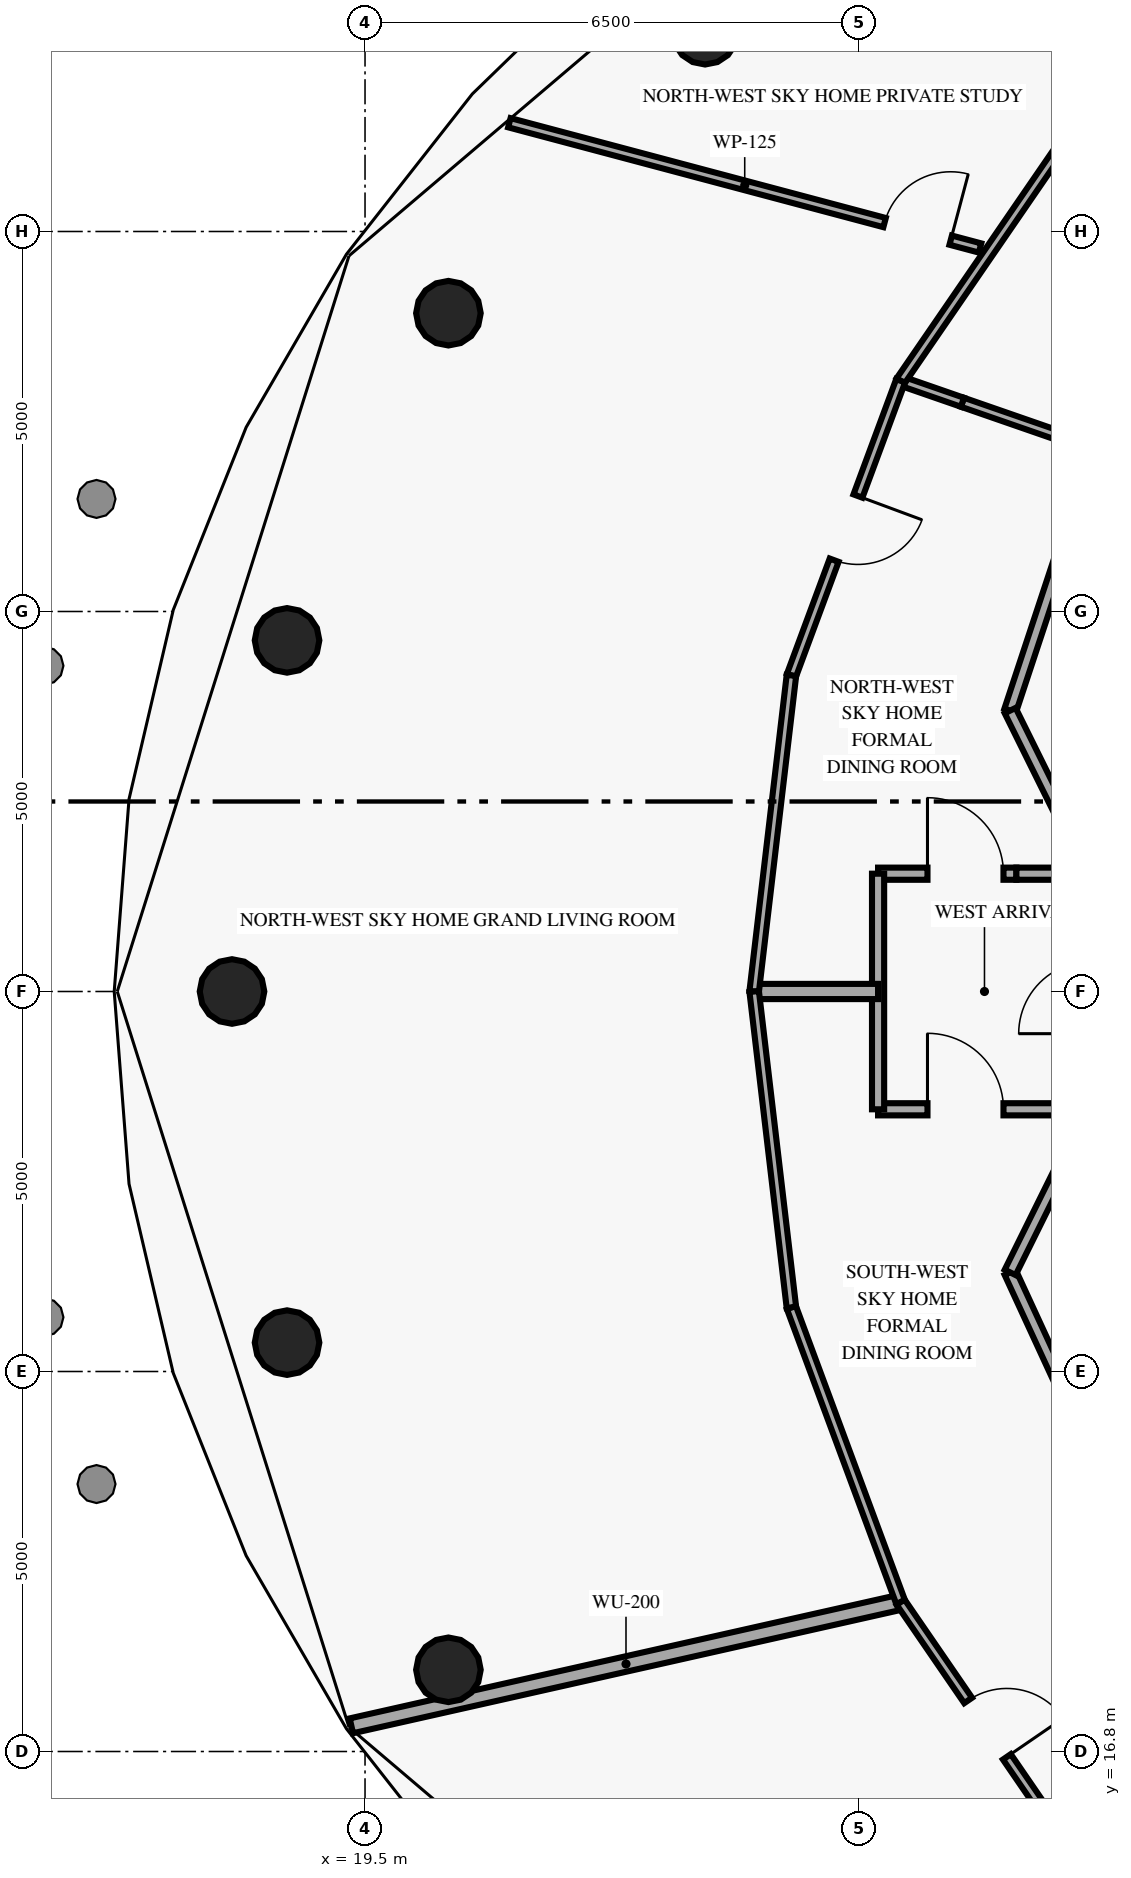
"""IFC4 building model, lengths in metres.
Left out: names, types, materials, properties, quantities, classifications, styles, units other than length and angle.
Written with IfcOpenShell. Run it as: python <this file> out.ifc"""

import sys

from ifc_helpers import new_model, si_unit, direction, frame, frame_2d, origin, origin_2d, place, context, subcontext, project, spatial, rectangle, circle, extrude, element, fill, save


model = new_model("IFC4")
c1 = context("Model", 3, precision=1e-05, world=origin(), true_north=direction((0.0, 1.0)))
c2 = subcontext(c1, "Body", "Model", "MODEL_VIEW")
j1 = project(units=[si_unit("LENGTHUNIT", "METRE"), si_unit("PLANEANGLEUNIT", "RADIAN")], contexts=[c1])
p1 = place(None, origin())
s1 = spatial("IfcSite", under=j1, at=p1, CompositionType="ELEMENT")
p2 = place(p1, origin())
s2 = spatial("IfcBuilding", under=s1, at=p2, CompositionType="ELEMENT")
p3 = place(p2, frame((0.0, 0.0, 251.95)))
s3 = spatial("IfcBuildingStorey", under=s2, at=p3, CompositionType="ELEMENT", Elevation=251.95)
for number, where, z_axis, x_axis in (
    (1, (23.974, 39.422, 0.0), (0.0, 0.0, 1.0), (1.0, 0.0, 0.0)),
    (2, (20.597, 35.725, 0.0), (0.0, 0.0, 1.0), (1.0, 0.0, 0.0)),
    (3, (18.474, 31.42, 0.0), (0.0, 0.0, 1.0), (1.0, 0.0, 0.0)),
    (4, (17.75, 26.8, 0.0), (0.0, 0.0, 1.0), (1.0, 0.0, 0.0)),
    (5, (18.474, 22.18, 0.0), (0.0, 0.0, 1.0), (1.0, 0.0, 0.0)),
    (6, (20.597, 17.875, 0.0), (0.0, 0.0, 1.0), (1.0, 0.0, 0.0)),
):
    element("IfcColumn", number, at=place(p3, frame(where, z_axis=z_axis, x_axis=x_axis)), inside=s3, PredefinedType="COLUMN", context=c2, shape_type="SweptSolid", body=[
        extrude(circle(Radius=0.425, at=origin_2d()), origin(), (0.0, 0.0, 1.0), 3.39),
    ])
p4 = place(p3, frame((29.127, 33.94, 0.0), z_axis=(0.0, 0.0, 1.0), x_axis=(-0.313985571683, -0.949427754374, 0.0)))
e7 = element("IfcWall", 7, at=p4, inside=s3, PredefinedType="PARTITIONING", context=c2, shape_type="SweptSolid", body=[
    extrude(rectangle(XDim=3.627, YDim=0.16, at=frame_2d((1.813, 0.0))), origin(), (0.0, 0.0, 1.0), 3.39),
])
p5 = place(p3, frame((27.988, 23.104, 0.0), z_axis=(0.0, 0.0, 1.0), x_axis=(0.418656179426, -0.908144814128, 0.0)))
e8 = element("IfcWall", 8, at=p5, inside=s3, PredefinedType="PARTITIONING", context=c2, shape_type="SweptSolid", body=[
    extrude(rectangle(XDim=7.049, YDim=0.16, at=frame_2d((3.524, 0.0))), origin(), (0.0, 0.0, 1.0), 3.39),
])
p6 = place(p3, frame((26.25, 28.35, 0.0), z_axis=(0.0, 0.0, 1.0), x_axis=(1.0, 0.0, 0.0)))
e9 = element("IfcWall", 9, at=p6, inside=s3, PredefinedType="PARTITIONING", context=c2, shape_type="SweptSolid", body=[
    extrude(rectangle(XDim=1.82, YDim=0.16, at=frame_2d((0.91, 0.0))), origin(), (0.0, 0.0, 1.0), 3.39),
])
p7 = place(p6, frame((0.65, 0.0, 0.0)))
e10 = element("IfcOpeningElement", 10, at=p7, cuts=e9, PredefinedType="OPENING", context=c2, shape_type="SweptSolid", body=[
    extrude(rectangle(XDim=1.0, YDim=2.02, at=frame_2d((0.5, 1.01))), frame((0.0, 0.09, 0.0), z_axis=(0.0, -1.0, 0.0), x_axis=(1.0, 0.0, 0.0)), (0.0, 0.0, 1.0), 0.18),
])
p8 = place(p3, frame((28.07, 28.35, 0.0), z_axis=(0.0, 0.0, 1.0), x_axis=(1.0, 0.0, 0.0)))
e11 = element("IfcWall", 11, at=p8, inside=s3, PredefinedType="PARTITIONING", context=c2, shape_type="SweptSolid", body=[
    extrude(rectangle(XDim=0.98, YDim=0.16, at=frame_2d((0.49, 0.0))), origin(), (0.0, 0.0, 1.0), 2.53),
])
p9 = place(p3, frame((26.25, 25.25, 0.0), z_axis=(0.0, 0.0, 1.0), x_axis=(1.0, 0.0, 0.0)))
e12 = element("IfcWall", 12, at=p9, inside=s3, PredefinedType="PARTITIONING", context=c2, shape_type="SweptSolid", body=[
    extrude(rectangle(XDim=2.8, YDim=0.16, at=frame_2d((1.4, 0.0))), origin(), (0.0, 0.0, 1.0), 3.39),
])
p10 = place(p9, frame((0.65, 0.0, 0.0)))
e13 = element("IfcOpeningElement", 13, at=p10, cuts=e12, PredefinedType="OPENING", context=c2, shape_type="SweptSolid", body=[
    extrude(rectangle(XDim=1.0, YDim=2.02, at=frame_2d((0.5, 1.01))), frame((0.0, 0.09, 0.0), z_axis=(0.0, -1.0, 0.0), x_axis=(1.0, 0.0, 0.0)), (0.0, 0.0, 1.0), 0.18),
])
p11 = place(p3, frame((26.25, 25.25, 0.0), z_axis=(0.0, 0.0, 1.0), x_axis=(0.0, 1.0, 0.0)))
e14 = element("IfcWall", 14, at=p11, inside=s3, PredefinedType="PARTITIONING", context=c2, shape_type="SweptSolid", body=[
    extrude(rectangle(XDim=3.1, YDim=0.16, at=frame_2d((1.55, 0.0))), origin(), (0.0, 0.0, 1.0), 3.39),
])
for number, where, z_axis, x_axis in (
    (15, (27.988, 30.496, 0.0), (0.0, 0.0, 1.0), (0.444, -0.896, 0.0)),
    (16, (27.988, 23.104, 0.0), (0.0, 0.0, 1.0), (0.444, 0.896, 0.0)),
):
    element("IfcWall", number, at=place(p3, frame(where, z_axis=z_axis, x_axis=x_axis)), inside=s3, PredefinedType="PARTITIONING", context=c2, shape_type="SweptSolid", body=[
        extrude(rectangle(XDim=2.394, YDim=0.16, at=frame_2d((1.197, 0.0))), origin(), (0.0, 0.0, 1.0), 3.39),
    ])
p12 = place(p3, frame((26.25, 26.8, 0.0), z_axis=(0.0, 0.0, 1.0), x_axis=(-1.0, 0.0, 0.0)))
e17 = element("IfcWall", 17, at=p12, inside=s3, PredefinedType="PARTITIONING", context=c2, shape_type="SweptSolid", body=[
    extrude(rectangle(XDim=1.63, YDim=0.2, at=frame_2d((0.815, 0.0))), origin(), (0.0, 0.0, 1.0), 3.39),
])
p13 = place(p3, frame((26.547, 18.765, 0.0), z_axis=(0.0, 0.0, 1.0), x_axis=(-0.975584694012, -0.219623552493, 0.0)))
e18 = element("IfcWall", 18, at=p13, inside=s3, PredefinedType="PARTITIONING", context=c2, shape_type="SweptSolid", body=[
    extrude(rectangle(XDim=7.408, YDim=0.2, at=frame_2d((3.704, 0.0))), origin(), (0.0, 0.0, 1.0), 3.39),
])
p14 = place(p3, frame((29.127, 33.94, 0.0), z_axis=(0.0, 0.0, 1.0), x_axis=(-0.944748361613, 0.327796481416, 0.0)))
e19 = element("IfcWall", 19, at=p14, inside=s3, PredefinedType="PARTITIONING", context=c2, shape_type="SweptSolid", body=[
    extrude(rectangle(XDim=1.87, YDim=0.125, at=frame_2d((0.935, 0.0))), origin(), (0.0, 0.0, 1.0), 3.39),
])
p15 = place(p3, frame((27.36, 34.553, 0.0), z_axis=(0.0, 0.0, 1.0), x_axis=(-0.944783504011, 0.327695179319, 0.0)))
e20 = element("IfcWall", 20, at=p15, inside=s3, PredefinedType="PARTITIONING", context=c2, shape_type="SweptSolid", body=[
    extrude(rectangle(XDim=0.861, YDim=0.125, at=frame_2d((0.43, 0.0))), origin(), (0.0, 0.0, 1.0), 2.19),
])
p16 = place(p3, frame((28.832, 38.163, 0.0), z_axis=(0.0, 0.0, 1.0), x_axis=(-0.565994846929, -0.824408778004, 0.0)))
e21 = element("IfcWall", 21, at=p16, inside=s3, PredefinedType="PARTITIONING", context=c2, shape_type="SweptSolid", body=[
    extrude(rectangle(XDim=4.037, YDim=0.125, at=frame_2d((2.019, 0.0))), origin(), (0.0, 0.0, 1.0), 3.39),
])
p17 = place(p3, frame((25.11, 30.959, 0.0), z_axis=(0.0, 0.0, 1.0), x_axis=(0.347625950087, 0.937633296564, 0.0)))
e22 = element("IfcWall", 22, at=p17, inside=s3, PredefinedType="PARTITIONING", context=c2, shape_type="SweptSolid", body=[
    extrude(rectangle(XDim=4.134, YDim=0.125, at=frame_2d((2.067, 0.0))), origin(), (0.0, 0.0, 1.0), 3.39),
])
p18 = place(p17, frame((1.617, 0.0, 0.0)))
e23 = element("IfcOpeningElement", 23, at=p18, cuts=e22, PredefinedType="OPENING", context=c2, shape_type="SweptSolid", body=[
    extrude(rectangle(XDim=0.9, YDim=2.02, at=frame_2d((0.45, 1.01))), frame((0.0, 0.073, 0.0), z_axis=(0.0, -1.0, 0.0), x_axis=(1.0, 0.0, 0.0)), (0.0, 0.0, 1.0), 0.145),
])
for number, where, z_axis, x_axis in (
    (24, (25.11, 30.959, 0.0), (0.0, 0.0, 1.0), (-0.117, -0.993, 0.0)),
    (25, (24.62, 26.8, 0.0), (0.0, 0.0, 1.0), (0.117, -0.993, 0.0)),
):
    element("IfcWall", number, at=place(p3, frame(where, z_axis=z_axis, x_axis=x_axis)), inside=s3, PredefinedType="PARTITIONING", context=c2, shape_type="SweptSolid", body=[
        extrude(rectangle(XDim=4.188, YDim=0.125, at=frame_2d((2.094, 0.0))), origin(), (0.0, 0.0, 1.0), 3.39),
    ])
p19 = place(p3, frame((25.11, 22.641, 0.0), z_axis=(0.0, 0.0, 1.0), x_axis=(0.347606700796, -0.937640432982, 0.0)))
e26 = element("IfcWall", 26, at=p19, inside=s3, PredefinedType="PARTITIONING", context=c2, shape_type="SweptSolid", body=[
    extrude(rectangle(XDim=4.134, YDim=0.125, at=frame_2d((2.067, 0.0))), origin(), (0.0, 0.0, 1.0), 3.39),
])
p20 = place(p3, frame((27.592, 36.583, 0.0), z_axis=(0.0, 0.0, 1.0), x_axis=(-0.966372641244, 0.257145714053, 0.0)))
e27 = element("IfcWall", 27, at=p20, inside=s3, PredefinedType="PARTITIONING", context=c2, shape_type="SweptSolid", body=[
    extrude(rectangle(XDim=6.409, YDim=0.125, at=frame_2d((3.204, 0.0))), origin(), (0.0, 0.0, 1.0), 3.39),
])
p21 = place(p20, frame((0.4, 0.0, 0.0)))
e28 = element("IfcOpeningElement", 28, at=p21, cuts=e27, PredefinedType="OPENING", context=c2, shape_type="SweptSolid", body=[
    extrude(rectangle(XDim=0.9, YDim=2.02, at=frame_2d((0.45, 1.01))), frame((0.0, 0.073, 0.0), z_axis=(0.0, -1.0, 0.0), x_axis=(1.0, 0.0, 0.0)), (0.0, 0.0, 1.0), 0.145),
])
p22 = place(p3, frame((28.832, 15.437, 0.0), z_axis=(0.0, 0.0, 1.0), x_axis=(-0.566023066777, 0.824389403059, 0.0)))
e29 = element("IfcWall", 29, at=p22, inside=s3, PredefinedType="PARTITIONING", context=c2, shape_type="SweptSolid", body=[
    extrude(rectangle(XDim=4.037, YDim=0.125, at=frame_2d((2.019, 0.0))), origin(), (0.0, 0.0, 1.0), 3.39),
])
p23 = place(p22, frame((1.568, 0.0, 0.0)))
e30 = element("IfcOpeningElement", 30, at=p23, cuts=e29, PredefinedType="OPENING", context=c2, shape_type="SweptSolid", body=[
    extrude(rectangle(XDim=0.9, YDim=2.02, at=frame_2d((0.45, 1.01))), frame((0.0, 0.073, 0.0), z_axis=(0.0, -1.0, 0.0), x_axis=(1.0, 0.0, 0.0)), (0.0, 0.0, 1.0), 0.145),
])
p24 = place(p7, origin())
e31 = element("IfcDoor", 31, at=p24, inside=s3, OperationType="SINGLE_SWING_LEFT", PredefinedType="DOOR", context=c2, shape_type="SweptSolid", body=[
    extrude(rectangle(XDim=1.0, YDim=2.02, at=frame_2d((0.5, 1.01))), frame((0.0, 0.025, 0.0), z_axis=(0.0, -1.0, 0.0), x_axis=(1.0, 0.0, 0.0)), (0.0, 0.0, 1.0), 0.05),
])
fill(e10, e31)
p25 = place(p10, origin())
e32 = element("IfcDoor", 32, at=p25, inside=s3, OperationType="SINGLE_SWING_LEFT", PredefinedType="DOOR", context=c2, shape_type="SweptSolid", body=[
    extrude(rectangle(XDim=1.0, YDim=2.02, at=frame_2d((0.5, 1.01))), frame((0.0, 0.025, 0.0), z_axis=(0.0, -1.0, 0.0), x_axis=(1.0, 0.0, 0.0)), (0.0, 0.0, 1.0), 0.05),
])
fill(e13, e32)
p26 = place(p18, origin())
e33 = element("IfcDoor", 33, at=p26, inside=s3, OperationType="SINGLE_SWING_RIGHT", PredefinedType="DOOR", context=c2, shape_type="SweptSolid", body=[
    extrude(rectangle(XDim=0.9, YDim=2.02, at=frame_2d((0.45, 1.01))), frame((0.0, 0.025, 0.0), z_axis=(0.0, -1.0, 0.0), x_axis=(1.0, 0.0, 0.0)), (0.0, 0.0, 1.0), 0.05),
])
fill(e23, e33)
p27 = place(p21, origin())
e34 = element("IfcDoor", 34, at=p27, inside=s3, OperationType="SINGLE_SWING_LEFT", PredefinedType="DOOR", context=c2, shape_type="SweptSolid", body=[
    extrude(rectangle(XDim=0.9, YDim=2.02, at=frame_2d((0.45, 1.01))), frame((0.0, 0.025, 0.0), z_axis=(0.0, -1.0, 0.0), x_axis=(1.0, 0.0, 0.0)), (0.0, 0.0, 1.0), 0.05),
])
fill(e28, e34)
p28 = place(p23, origin())
e35 = element("IfcDoor", 35, at=p28, inside=s3, OperationType="SINGLE_SWING_LEFT", PredefinedType="DOOR", context=c2, shape_type="SweptSolid", body=[
    extrude(rectangle(XDim=0.9, YDim=2.02, at=frame_2d((0.45, 1.01))), frame((0.0, 0.025, 0.0), z_axis=(0.0, -1.0, 0.0), x_axis=(1.0, 0.0, 0.0)), (0.0, 0.0, 1.0), 0.05),
])
fill(e30, e35)
save(model, sys.argv[1])
